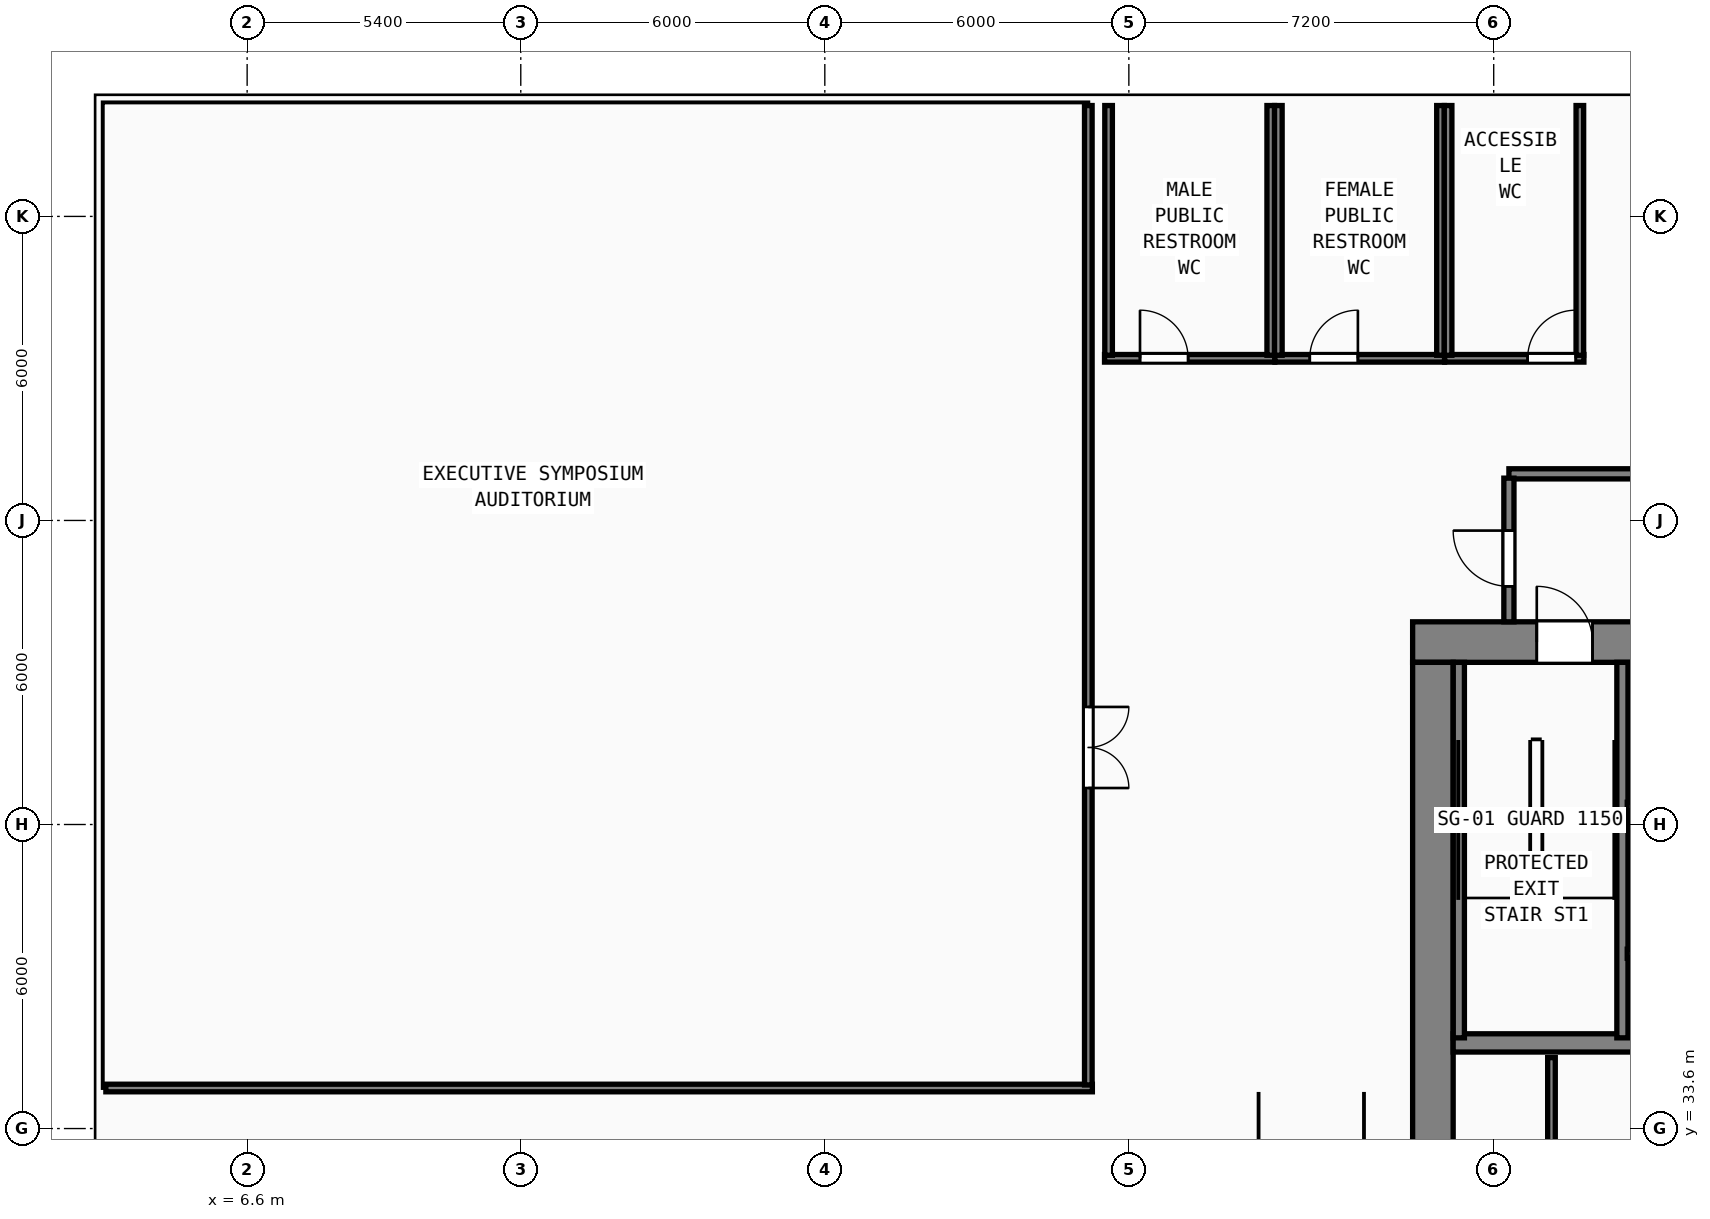
"""IFC4 building model, lengths in metres.
Left out: names, types, materials, properties, quantities, classifications, styles, units other than length and angle.
Written with IfcOpenShell. Run it as: python <this file> out.ifc"""

import sys

from ifc_helpers import new_model, si_unit, direction, frame, frame_2d, origin, origin_2d, place, context, subcontext, project, spatial, rectangle, hollow_rectangle, extrude, element, fill, save


model = new_model("IFC4")
c1 = context("Model", 3, precision=1e-05, world=origin(), true_north=direction((0.0, 1.0)))
c2 = subcontext(c1, "Body", "Model", "MODEL_VIEW")
j1 = project(units=[si_unit("LENGTHUNIT", "METRE"), si_unit("PLANEANGLEUNIT", "RADIAN")], contexts=[c1])
p1 = place(None, origin())
s1 = spatial("IfcSite", under=j1, at=p1, CompositionType="ELEMENT")
p2 = place(p1, origin())
s2 = spatial("IfcBuilding", under=s1, at=p2, CompositionType="ELEMENT")
p3 = place(p2, frame((0.0, 0.0, 15.6)))
s3 = spatial("IfcBuildingStorey", under=s2, at=p3, CompositionType="ELEMENT", Elevation=15.6)
p4 = place(p3, frame((29.6, 43.2, 0.0), z_axis=(0.0, 0.0, 1.0), x_axis=(1.0, 0.0, 0.0)))
e1 = element("IfcWall", 1, at=p4, inside=s3, PredefinedType="SHEAR", context=c2, shape_type="SweptSolid", body=[
    extrude(rectangle(XDim=17.6, YDim=0.8, at=frame_2d((8.8, 0.0))), origin(), (0.0, 0.0, 1.0), 3.78),
])
p5 = place(p4, frame((2.45, 0.0, 0.0)))
e2 = element("IfcOpeningElement", 2, at=p5, cuts=e1, PredefinedType="OPENING", context=c2, shape_type="SweptSolid", body=[
    extrude(rectangle(XDim=1.1, YDim=2.15, at=frame_2d((0.55, 1.075))), frame((0.0, 0.41, 0.0), z_axis=(0.0, -1.0, 0.0), x_axis=(1.0, 0.0, 0.0)), (0.0, 0.0, 1.0), 0.82),
])
p6 = place(p4, frame((7.56, 0.0, 0.0)))
e3 = element("IfcOpeningElement", 3, at=p6, cuts=e1, PredefinedType="OPENING", context=c2, shape_type="SweptSolid", body=[
    extrude(rectangle(XDim=1.1, YDim=2.15, at=frame_2d((0.55, 1.075))), frame((0.0, 0.41, 0.0), z_axis=(0.0, -1.0, 0.0), x_axis=(1.0, 0.0, 0.0)), (0.0, 0.0, 1.0), 0.82),
])
p7 = place(p4, frame((13.65, 0.0, 0.0)))
e4 = element("IfcOpeningElement", 4, at=p7, cuts=e1, PredefinedType="OPENING", context=c2, shape_type="SweptSolid", body=[
    extrude(rectangle(XDim=1.1, YDim=2.15, at=frame_2d((0.55, 1.075))), frame((0.0, 0.41, 0.0), z_axis=(0.0, -1.0, 0.0), x_axis=(1.0, 0.0, 0.0)), (0.0, 0.0, 1.0), 0.82),
])
p8 = place(p4, frame((4.78, 0.0, 0.0)))
e5 = element("IfcOpeningElement", 5, at=p8, cuts=e1, PredefinedType="OPENING", context=c2, shape_type="SweptSolid", body=[
    extrude(rectangle(XDim=1.1, YDim=2.2, at=frame_2d((0.55, 1.1))), frame((0.0, 0.41, 0.0), z_axis=(0.0, -1.0, 0.0), x_axis=(1.0, 0.0, 0.0)), (0.0, 0.0, 1.0), 0.82),
])
p9 = place(p4, frame((11.14, 0.0, 0.0)))
e6 = element("IfcOpeningElement", 6, at=p9, cuts=e1, PredefinedType="OPENING", context=c2, shape_type="SweptSolid", body=[
    extrude(rectangle(XDim=1.1, YDim=2.2, at=frame_2d((0.55, 1.1))), frame((0.0, 0.41, 0.0), z_axis=(0.0, -1.0, 0.0), x_axis=(1.0, 0.0, 0.0)), (0.0, 0.0, 1.0), 0.82),
])
p10 = place(p3, frame((30.0, 32.8, 0.0), z_axis=(0.0, 0.0, 1.0), x_axis=(0.0, 1.0, 0.0)))
e7 = element("IfcWall", 7, at=p10, inside=s3, PredefinedType="SHEAR", context=c2, shape_type="SweptSolid", body=[
    extrude(rectangle(XDim=10.0, YDim=0.8, at=frame_2d((5.0, 0.0))), origin(), (0.0, 0.0, 1.0), 3.78),
])
p11 = place(p3, frame((30.4, 35.29, 0.0), z_axis=(0.0, 0.0, 1.0), x_axis=(1.0, 0.0, 0.0)))
e8 = element("IfcWall", 8, at=p11, inside=s3, PredefinedType="SHEAR", context=c2, shape_type="SweptSolid", body=[
    extrude(rectangle(XDim=16.0, YDim=0.36, at=frame_2d((8.0, 0.0))), origin(), (0.0, 0.0, 1.0), 3.78),
])
p12 = place(p11, frame((4.95, 0.0, 0.0), z_axis=(0.0, 0.0, 1.0), x_axis=(-1.0, 0.0, 0.0)))
e9 = element("IfcOpeningElement", 9, at=p12, cuts=e8, PredefinedType="OPENING", context=c2, shape_type="SweptSolid", body=[
    extrude(rectangle(XDim=0.9, YDim=2.1, at=frame_2d((0.45, 1.05))), frame((0.0, 0.19, 0.0), z_axis=(0.0, -1.0, 0.0), x_axis=(1.0, 0.0, 0.0)), (0.0, 0.0, 1.0), 0.38),
])
p13 = place(p11, frame((12.01, 0.0, 0.0), z_axis=(0.0, 0.0, 1.0), x_axis=(-1.0, 0.0, 0.0)))
e10 = element("IfcOpeningElement", 10, at=p13, cuts=e8, PredefinedType="OPENING", context=c2, shape_type="SweptSolid", body=[
    extrude(rectangle(XDim=0.9, YDim=2.1, at=frame_2d((0.45, 1.05))), frame((0.0, 0.19, 0.0), z_axis=(0.0, -1.0, 0.0), x_axis=(1.0, 0.0, 0.0)), (0.0, 0.0, 1.0), 0.38),
])
for number, where, z_axis, x_axis in (
    (11, (30.512, 35.39, 0.0), (0.0, 0.0, 1.0), (0.0, 1.0, 0.0)),
    (12, (33.74, 35.39, 0.0), (0.0, 0.0, 1.0), (0.0, 1.0, 0.0)),
):
    element("IfcWall", number, at=place(p3, frame(where, z_axis=z_axis, x_axis=x_axis)), inside=s3, PredefinedType="SHEAR", context=c2, shape_type="SweptSolid", body=[
        extrude(rectangle(XDim=7.41, YDim=0.22, at=frame_2d((3.705, 0.0))), origin(), (0.0, 0.0, 1.0), 3.78),
    ])
for number, where, z_axis, x_axis in (
    (13, (24.0, 33.6, 0.0), (0.0, 0.0, 1.0), (1.0, 0.0, 0.0)),
    (14, (24.0, 45.6, 0.0), (0.0, 0.0, 1.0), (1.0, 0.0, 0.0)),
    (15, (31.2, 50.4, 0.0), (0.0, 0.0, 1.0), (1.0, 0.0, 0.0)),
    (16, (12.6, 38.4, 0.0), (0.0, 0.0, 1.0), (1.0, 0.0, 0.0)),
):
    element("IfcColumn", number, at=place(p3, frame(where, z_axis=z_axis, x_axis=x_axis)), inside=s3, PredefinedType="COLUMN", context=c2, shape_type="SweptSolid", body=[
        extrude(hollow_rectangle(XDim=1.3, YDim=1.3, WallThickness=0.048, at=origin_2d()), origin(), (0.0, 0.0, 1.0), 4.2),
    ])
for number, where, z_axis, x_axis in (
    (17, (6.6, 51.6, 0.0), (0.0, 0.0, 1.0), (1.0, 0.0, 0.0)),
    (18, (18.0, 51.6, 0.0), (0.0, 0.0, 1.0), (1.0, 0.0, 0.0)),
):
    element("IfcColumn", number, at=place(p3, frame(where, z_axis=z_axis, x_axis=x_axis)), inside=s3, PredefinedType="COLUMN", context=c2, shape_type="SweptSolid", body=[
        extrude(rectangle(XDim=0.9, YDim=0.9, at=origin_2d()), origin(), (0.0, 0.0, 1.0), 4.2),
    ])
p14 = place(p3, frame((31.5, 46.52, 0.0), z_axis=(0.0, 0.0, 1.0), x_axis=(1.0, 0.0, 0.0)))
e19 = element("IfcWall", 19, at=p14, inside=s3, PredefinedType="SOLIDWALL", context=c2, shape_type="SweptSolid", body=[
    extrude(rectangle(XDim=13.8, YDim=0.2, at=frame_2d((6.9, 0.0))), origin(), (0.0, 0.0, 1.0), 3.78),
])
p15 = place(p3, frame((31.5, 43.6, 0.0), z_axis=(0.0, 0.0, 1.0), x_axis=(0.0, 1.0, 0.0)))
e20 = element("IfcWall", 20, at=p15, inside=s3, PredefinedType="SOLIDWALL", context=c2, shape_type="SweptSolid", body=[
    extrude(rectangle(XDim=2.835, YDim=0.2, at=frame_2d((1.417, 0.0))), origin(), (0.0, 0.0, 1.0), 3.78),
])
p16 = place(p15, frame((1.8, 0.0, 0.0), z_axis=(0.0, 0.0, 1.0), x_axis=(-1.0, 0.0, 0.0)))
e21 = element("IfcOpeningElement", 21, at=p16, cuts=e20, PredefinedType="OPENING", context=c2, shape_type="SweptSolid", body=[
    extrude(rectangle(XDim=1.1, YDim=2.15, at=frame_2d((0.55, 1.075))), frame((0.0, 0.11, 0.0), z_axis=(0.0, -1.0, 0.0), x_axis=(1.0, 0.0, 0.0)), (0.0, 0.0, 1.0), 0.22),
])
p17 = place(p3, frame((33.835, 39.95, 0.0), z_axis=(0.0, 0.0, 1.0), x_axis=(1.0, 0.0, 0.0)))
e22 = element("IfcWall", 22, at=p17, inside=s3, PredefinedType="SOLIDWALL", context=c2, shape_type="SweptSolid", body=[
    extrude(rectangle(XDim=2.77, YDim=0.18, at=frame_2d((1.385, 0.0))), origin(), (0.0, 0.0, 1.0), 3.78),
])
p18 = place(p3, frame((33.835, 37.05, 0.0), z_axis=(0.0, 0.0, 1.0), x_axis=(1.0, 0.0, 0.0)))
e23 = element("IfcWall", 23, at=p18, inside=s3, PredefinedType="SOLIDWALL", context=c2, shape_type="SweptSolid", body=[
    extrude(rectangle(XDim=2.77, YDim=0.18, at=frame_2d((1.385, 0.0))), origin(), (0.0, 0.0, 1.0), 3.78),
])
p19 = place(p18, frame((1.945, 0.0, 0.0), z_axis=(0.0, 0.0, 1.0), x_axis=(-1.0, 0.0, 0.0)))
e24 = element("IfcOpeningElement", 24, at=p19, cuts=e23, PredefinedType="OPENING", context=c2, shape_type="SweptSolid", body=[
    extrude(rectangle(XDim=1.2, YDim=2.2, at=frame_2d((0.6, 1.1))), frame((0.0, 0.1, 0.0), z_axis=(0.0, -1.0, 0.0), x_axis=(1.0, 0.0, 0.0)), (0.0, 0.0, 1.0), 0.2),
])
p20 = place(p3, frame((32.34, 32.95, 0.0), z_axis=(0.0, 0.0, 1.0), x_axis=(0.0, 1.0, 0.0)))
e25 = element("IfcWall", 25, at=p20, inside=s3, PredefinedType="SOLIDWALL", context=c2, shape_type="SweptSolid", body=[
    extrude(rectangle(XDim=2.05, YDim=0.15, at=frame_2d((1.025, 0.0))), origin(), (0.0, 0.0, 1.0), 3.78),
])
p21 = place(p3, frame((23.52, 48.8, 0.0), z_axis=(0.0, 0.0, 1.0), x_axis=(1.0, 0.0, 0.0)))
e26 = element("IfcWall", 26, at=p21, inside=s3, PredefinedType="PARTITIONING", context=c2, shape_type="SweptSolid", body=[
    extrude(rectangle(XDim=3.36, YDim=0.15, at=frame_2d((1.68, 0.0))), origin(), (0.0, 0.0, 1.0), 3.78),
])
p22 = place(p21, frame((0.7, 0.0, 0.0)))
e27 = element("IfcOpeningElement", 27, at=p22, cuts=e26, PredefinedType="OPENING", context=c2, shape_type="SweptSolid", body=[
    extrude(rectangle(XDim=0.95, YDim=2.12, at=frame_2d((0.475, 1.06))), frame((0.0, 0.085, 0.0), z_axis=(0.0, -1.0, 0.0), x_axis=(1.0, 0.0, 0.0)), (0.0, 0.0, 1.0), 0.17),
])
for number, where, z_axis, x_axis in (
    (28, (23.6, 48.86, 0.0), (0.0, 0.0, 1.0), (0.0, 1.0, 0.0)),
    (29, (26.8, 48.86, 0.0), (0.0, 0.0, 1.0), (0.0, 1.0, 0.0)),
):
    element("IfcWall", number, at=place(p3, frame(where, z_axis=z_axis, x_axis=x_axis)), inside=s3, PredefinedType="PARTITIONING", context=c2, shape_type="SweptSolid", body=[
        extrude(rectangle(XDim=4.928, YDim=0.15, at=frame_2d((2.464, 0.0))), origin(), (0.0, 0.0, 1.0), 3.78),
    ])
p23 = place(p3, frame((26.882, 48.8, 0.0), z_axis=(0.0, 0.0, 1.0), x_axis=(1.0, 0.0, 0.0)))
e30 = element("IfcWall", 30, at=p23, inside=s3, PredefinedType="PARTITIONING", context=c2, shape_type="SweptSolid", body=[
    extrude(rectangle(XDim=3.348, YDim=0.15, at=frame_2d((1.674, 0.0))), origin(), (0.0, 0.0, 1.0), 3.78),
])
p24 = place(p23, frame((0.688, 0.0, 0.0)))
e31 = element("IfcOpeningElement", 31, at=p24, cuts=e30, PredefinedType="OPENING", context=c2, shape_type="SweptSolid", body=[
    extrude(rectangle(XDim=0.95, YDim=2.12, at=frame_2d((0.475, 1.06))), frame((0.0, 0.085, 0.0), z_axis=(0.0, -1.0, 0.0), x_axis=(1.0, 0.0, 0.0)), (0.0, 0.0, 1.0), 0.17),
])
for number, where, z_axis, x_axis in (
    (32, (26.95, 48.86, 0.0), (0.0, 0.0, 1.0), (0.0, 1.0, 0.0)),
    (33, (30.15, 48.86, 0.0), (0.0, 0.0, 1.0), (0.0, 1.0, 0.0)),
):
    element("IfcWall", number, at=place(p3, frame(where, z_axis=z_axis, x_axis=x_axis)), inside=s3, PredefinedType="PARTITIONING", context=c2, shape_type="SweptSolid", body=[
        extrude(rectangle(XDim=4.928, YDim=0.15, at=frame_2d((2.464, 0.0))), origin(), (0.0, 0.0, 1.0), 3.78),
    ])
p25 = place(p3, frame((30.232, 48.8, 0.0), z_axis=(0.0, 0.0, 1.0), x_axis=(1.0, 0.0, 0.0)))
e34 = element("IfcWall", 34, at=p25, inside=s3, PredefinedType="PARTITIONING", context=c2, shape_type="SweptSolid", body=[
    extrude(rectangle(XDim=2.748, YDim=0.15, at=frame_2d((1.374, 0.0))), origin(), (0.0, 0.0, 1.0), 3.78),
])
p26 = place(p25, frame((1.638, 0.0, 0.0)))
e35 = element("IfcOpeningElement", 35, at=p26, cuts=e34, PredefinedType="OPENING", context=c2, shape_type="SweptSolid", body=[
    extrude(rectangle(XDim=0.95, YDim=2.12, at=frame_2d((0.475, 1.06))), frame((0.0, 0.085, 0.0), z_axis=(0.0, -1.0, 0.0), x_axis=(1.0, 0.0, 0.0)), (0.0, 0.0, 1.0), 0.17),
])
for number, where, z_axis, x_axis in (
    (36, (30.3, 48.86, 0.0), (0.0, 0.0, 1.0), (0.0, 1.0, 0.0)),
    (37, (32.9, 48.86, 0.0), (0.0, 0.0, 1.0), (0.0, 1.0, 0.0)),
):
    element("IfcWall", number, at=place(p3, frame(where, z_axis=z_axis, x_axis=x_axis)), inside=s3, PredefinedType="PARTITIONING", context=c2, shape_type="SweptSolid", body=[
        extrude(rectangle(XDim=4.928, YDim=0.15, at=frame_2d((2.464, 0.0))), origin(), (0.0, 0.0, 1.0), 3.78),
    ])
p27 = place(p3, frame((3.812, 34.4, 0.0), z_axis=(0.0, 0.0, 1.0), x_axis=(1.0, 0.0, 0.0)))
e38 = element("IfcWall", 38, at=p27, inside=s3, PredefinedType="PARTITIONING", context=c2, shape_type="SweptSolid", body=[
    extrude(rectangle(XDim=19.468, YDim=0.15, at=frame_2d((9.734, 0.0))), origin(), (0.0, 0.0, 1.0), 3.78),
])
p28 = place(p3, frame((23.2, 34.46, 0.0), z_axis=(0.0, 0.0, 1.0), x_axis=(0.0, 1.0, 0.0)))
e39 = element("IfcWall", 39, at=p28, inside=s3, PredefinedType="PARTITIONING", context=c2, shape_type="SweptSolid", body=[
    extrude(rectangle(XDim=19.328, YDim=0.15, at=frame_2d((9.664, 0.0))), origin(), (0.0, 0.0, 1.0), 3.78),
])
p29 = place(p28, frame((7.46, 0.0, 0.0), z_axis=(0.0, 0.0, 1.0), x_axis=(-1.0, 0.0, 0.0)))
e40 = element("IfcOpeningElement", 40, at=p29, cuts=e39, PredefinedType="OPENING", context=c2, shape_type="SweptSolid", body=[
    extrude(rectangle(XDim=1.6, YDim=2.25, at=frame_2d((0.8, 1.125))), frame((0.0, 0.085, 0.0), z_axis=(0.0, -1.0, 0.0), x_axis=(1.0, 0.0, 0.0)), (0.0, 0.0, 1.0), 0.17),
])
p30 = place(p5, origin())
e41 = element("IfcDoor", 41, at=p30, inside=s3, OperationType="SINGLE_SWING_LEFT", PredefinedType="DOOR", context=c2, shape_type="SweptSolid", body=[
    extrude(rectangle(XDim=1.1, YDim=2.15, at=frame_2d((0.55, 1.075))), frame((0.0, 0.185, 0.0), z_axis=(0.0, -1.0, 0.0), x_axis=(1.0, 0.0, 0.0)), (0.0, 0.0, 1.0), 0.05),
])
fill(e2, e41)
p31 = place(p16, origin())
e42 = element("IfcDoor", 42, at=p31, inside=s3, OperationType="SINGLE_SWING_LEFT", PredefinedType="DOOR", context=c2, shape_type="SweptSolid", body=[
    extrude(rectangle(XDim=1.1, YDim=2.15, at=frame_2d((0.55, 1.075))), frame((0.0, 0.025, 0.0), z_axis=(0.0, -1.0, 0.0), x_axis=(1.0, 0.0, 0.0)), (0.0, 0.0, 1.0), 0.05),
])
fill(e21, e42)
p32 = place(p22, origin())
e43 = element("IfcDoor", 43, at=p32, inside=s3, OperationType="SINGLE_SWING_LEFT", PredefinedType="DOOR", context=c2, shape_type="SweptSolid", body=[
    extrude(rectangle(XDim=0.95, YDim=2.12, at=frame_2d((0.475, 1.06))), frame((0.0, 0.025, 0.0), z_axis=(0.0, -1.0, 0.0), x_axis=(1.0, 0.0, 0.0)), (0.0, 0.0, 1.0), 0.05),
])
fill(e27, e43)
p33 = place(p24, origin())
e44 = element("IfcDoor", 44, at=p33, inside=s3, OperationType="SINGLE_SWING_RIGHT", PredefinedType="DOOR", context=c2, shape_type="SweptSolid", body=[
    extrude(rectangle(XDim=0.95, YDim=2.12, at=frame_2d((0.475, 1.06))), frame((0.0, 0.025, 0.0), z_axis=(0.0, -1.0, 0.0), x_axis=(1.0, 0.0, 0.0)), (0.0, 0.0, 1.0), 0.05),
])
fill(e31, e44)
p34 = place(p26, origin())
e45 = element("IfcDoor", 45, at=p34, inside=s3, OperationType="SINGLE_SWING_RIGHT", PredefinedType="DOOR", context=c2, shape_type="SweptSolid", body=[
    extrude(rectangle(XDim=0.95, YDim=2.12, at=frame_2d((0.475, 1.06))), frame((0.0, 0.025, 0.0), z_axis=(0.0, -1.0, 0.0), x_axis=(1.0, 0.0, 0.0)), (0.0, 0.0, 1.0), 0.05),
])
fill(e35, e45)
p35 = place(p29, origin())
e46 = element("IfcDoor", 46, at=p35, inside=s3, OperationType="DOUBLE_DOOR_SINGLE_SWING", PredefinedType="DOOR", context=c2, shape_type="SweptSolid", body=[
    extrude(rectangle(XDim=1.6, YDim=2.25, at=frame_2d((0.8, 1.125))), frame((0.0, 0.025, 0.0), z_axis=(0.0, -1.0, 0.0), x_axis=(1.0, 0.0, 0.0)), (0.0, 0.0, 1.0), 0.05),
])
fill(e40, e46)
save(model, sys.argv[1])
